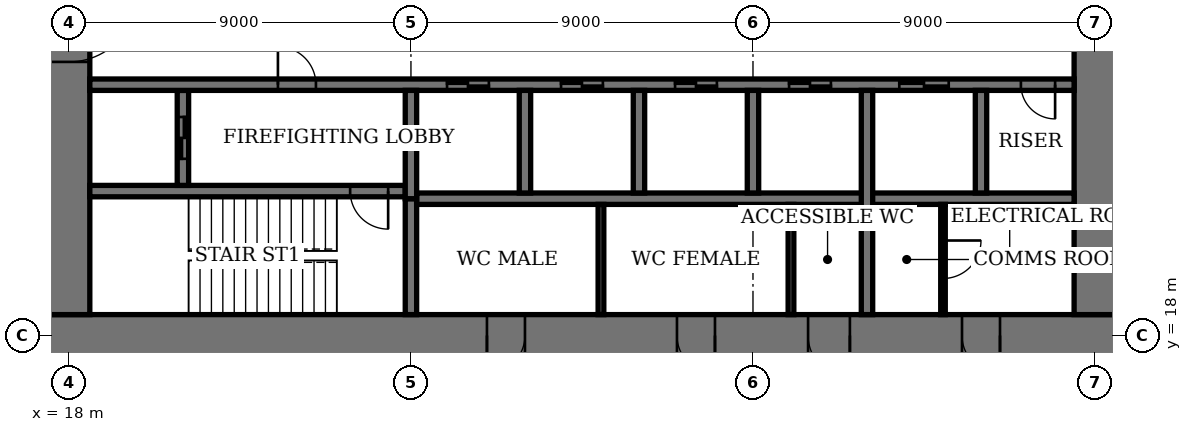
"""IFC4 building model, lengths in metres.
Left out: names, types, materials, properties, quantities, classifications, styles, units other than length and angle.
Written with IfcOpenShell. Run it as: python <this file> out.ifc"""

import sys

from ifc_helpers import new_model, si_unit, direction, frame, frame_2d, origin, place, context, subcontext, project, spatial, rectangle, extrude, element, fill, save


model = new_model("IFC4")
c1 = context("Model", 3, precision=1e-05, world=origin(), true_north=direction((0.0, 1.0)))
c2 = subcontext(c1, "Body", "Model", "MODEL_VIEW")
j1 = project(units=[si_unit("LENGTHUNIT", "METRE"), si_unit("PLANEANGLEUNIT", "RADIAN")], contexts=[c1])
p1 = place(None, origin())
s1 = spatial("IfcSite", under=j1, at=p1, CompositionType="ELEMENT")
p2 = place(p1, origin())
s2 = spatial("IfcBuilding", under=s1, at=p2, CompositionType="ELEMENT")
p3 = place(p2, frame((0.0, 0.0, 251.4)))
s3 = spatial("IfcBuildingStorey", under=s2, at=p3, CompositionType="ELEMENT", Elevation=251.4)
p4 = place(p3, frame((17.45, 18.0, 0.0), z_axis=(0.0, 0.0, 1.0), x_axis=(1.0, 0.0, 0.0)))
e1 = element("IfcWall", 1, at=p4, inside=s3, PredefinedType="SHEAR", context=c2, shape_type="SweptSolid", body=[
    extrude(rectangle(XDim=28.1, YDim=1.1, at=frame_2d((14.05, 0.0))), origin(), (0.0, 0.0, 1.0), 4.0),
])
p5 = place(p4, frame((11.55, 0.0, 0.0)))
e2 = element("IfcOpeningElement", 2, at=p5, cuts=e1, PredefinedType="OPENING", context=c2, shape_type="SweptSolid", body=[
    extrude(rectangle(XDim=1.0, YDim=2.4, at=frame_2d((0.5, 1.2))), frame((0.0, 0.56, 0.0), z_axis=(0.0, -1.0, 0.0), x_axis=(1.0, 0.0, 0.0)), (0.0, 0.0, 1.0), 1.12),
])
p6 = place(p4, frame((16.55, 0.0, 0.0)))
e3 = element("IfcOpeningElement", 3, at=p6, cuts=e1, PredefinedType="OPENING", context=c2, shape_type="SweptSolid", body=[
    extrude(rectangle(XDim=1.0, YDim=2.4, at=frame_2d((0.5, 1.2))), frame((0.0, 0.56, 0.0), z_axis=(0.0, -1.0, 0.0), x_axis=(1.0, 0.0, 0.0)), (0.0, 0.0, 1.0), 1.12),
])
p7 = place(p4, frame((20.0, 0.0, 0.0)))
e4 = element("IfcOpeningElement", 4, at=p7, cuts=e1, PredefinedType="OPENING", context=c2, shape_type="SweptSolid", body=[
    extrude(rectangle(XDim=1.1, YDim=2.4, at=frame_2d((0.55, 1.2))), frame((0.0, 0.56, 0.0), z_axis=(0.0, -1.0, 0.0), x_axis=(1.0, 0.0, 0.0)), (0.0, 0.0, 1.0), 1.12),
])
p8 = place(p4, frame((24.05, 0.0, 0.0)))
e5 = element("IfcOpeningElement", 5, at=p8, cuts=e1, PredefinedType="OPENING", context=c2, shape_type="SweptSolid", body=[
    extrude(rectangle(XDim=1.0, YDim=2.4, at=frame_2d((0.5, 1.2))), frame((0.0, 0.56, 0.0), z_axis=(0.0, -1.0, 0.0), x_axis=(1.0, 0.0, 0.0)), (0.0, 0.0, 1.0), 1.12),
])
p9 = place(p3, frame((18.0, 35.45, 0.0), z_axis=(0.0, 0.0, 1.0), x_axis=(0.0, -1.0, 0.0)))
e6 = element("IfcWall", 6, at=p9, inside=s3, PredefinedType="SHEAR", context=c2, shape_type="SweptSolid", body=[
    extrude(rectangle(XDim=16.9, YDim=1.1, at=frame_2d((8.45, 0.0))), origin(), (0.0, 0.0, 1.0), 4.0),
])
p10 = place(p9, frame((8.45, 0.0, 0.0)))
e7 = element("IfcOpeningElement", 7, at=p10, cuts=e6, PredefinedType="OPENING", context=c2, shape_type="SweptSolid", body=[
    extrude(rectangle(XDim=1.8, YDim=2.4, at=frame_2d((0.9, 1.2))), frame((0.0, 0.56, 0.0), z_axis=(0.0, -1.0, 0.0), x_axis=(1.0, 0.0, 0.0)), (0.0, 0.0, 1.0), 1.12),
])
p11 = place(p3, frame((45.0, 18.55, 0.0), z_axis=(0.0, 0.0, 1.0), x_axis=(0.0, 1.0, 0.0)))
e8 = element("IfcWall", 8, at=p11, inside=s3, PredefinedType="SHEAR", context=c2, shape_type="SweptSolid", body=[
    extrude(rectangle(XDim=16.9, YDim=1.1, at=frame_2d((8.45, 0.0))), origin(), (0.0, 0.0, 1.0), 4.0),
])
p12 = place(p11, frame((8.45, 0.0, 0.0)))
e9 = element("IfcOpeningElement", 9, at=p12, cuts=e8, PredefinedType="OPENING", context=c2, shape_type="SweptSolid", body=[
    extrude(rectangle(XDim=1.8, YDim=2.4, at=frame_2d((0.9, 1.2))), frame((0.0, 0.56, 0.0), z_axis=(0.0, -1.0, 0.0), x_axis=(1.0, 0.0, 0.0)), (0.0, 0.0, 1.0), 1.12),
])
p13 = place(p3, frame((18.55, 21.8, 0.0), z_axis=(0.0, 0.0, 1.0), x_axis=(1.0, 0.0, 0.0)))
e10 = element("IfcWall", 10, at=p13, inside=s3, PredefinedType="SHEAR", context=c2, shape_type="SweptSolid", body=[
    extrude(rectangle(XDim=8.3, YDim=0.3, at=frame_2d((4.15, 0.0))), origin(), (0.0, 0.0, 1.0), 4.0),
])
p14 = place(p13, frame((6.85, 0.0, 0.0)))
e11 = element("IfcOpeningElement", 11, at=p14, cuts=e10, PredefinedType="OPENING", context=c2, shape_type="SweptSolid", body=[
    extrude(rectangle(XDim=1.0, YDim=2.4, at=frame_2d((0.5, 1.2))), frame((0.0, 0.16, 0.0), z_axis=(0.0, -1.0, 0.0), x_axis=(1.0, 0.0, 0.0)), (0.0, 0.0, 1.0), 0.32),
])
p15 = place(p3, frame((27.0, 18.55, 0.0), z_axis=(0.0, 0.0, 1.0), x_axis=(0.0, 1.0, 0.0)))
e12 = element("IfcWall", 12, at=p15, inside=s3, PredefinedType="SHEAR", context=c2, shape_type="SweptSolid", body=[
    extrude(rectangle(XDim=3.05, YDim=0.3, at=frame_2d((1.525, 0.0))), origin(), (0.0, 0.0, 1.0), 4.0),
])
p16 = place(p3, frame((21.0, 21.95, 0.0), z_axis=(0.0, 0.0, 1.0), x_axis=(0.0, 1.0, 0.0)))
e13 = element("IfcWall", 13, at=p16, inside=s3, PredefinedType="SHEAR", context=c2, shape_type="SweptSolid", body=[
    extrude(rectangle(XDim=2.5, YDim=0.3, at=frame_2d((1.25, 0.0))), origin(), (0.0, 0.0, 1.0), 4.0),
])
p17 = place(p16, frame((0.7, 0.0, 0.0)))
e14 = element("IfcOpeningElement", 14, at=p17, cuts=e13, PredefinedType="OPENING", context=c2, shape_type="SweptSolid", body=[
    extrude(rectangle(XDim=1.1, YDim=2.4, at=frame_2d((0.55, 1.2))), frame((0.0, 0.16, 0.0), z_axis=(0.0, -1.0, 0.0), x_axis=(1.0, 0.0, 0.0)), (0.0, 0.0, 1.0), 0.32),
])
p18 = place(p3, frame((18.55, 24.6, 0.0), z_axis=(0.0, 0.0, 1.0), x_axis=(1.0, 0.0, 0.0)))
e15 = element("IfcWall", 15, at=p18, inside=s3, PredefinedType="SHEAR", context=c2, shape_type="SweptSolid", body=[
    extrude(rectangle(XDim=25.9, YDim=0.3, at=frame_2d((12.95, 0.0))), origin(), (0.0, 0.0, 1.0), 4.0),
])
p19 = place(p18, frame((4.95, 0.0, 0.0)))
e16 = element("IfcOpeningElement", 16, at=p19, cuts=e15, PredefinedType="OPENING", context=c2, shape_type="SweptSolid", body=[
    extrude(rectangle(XDim=1.0, YDim=2.4, at=frame_2d((0.5, 1.2))), frame((0.0, 0.16, 0.0), z_axis=(0.0, -1.0, 0.0), x_axis=(1.0, 0.0, 0.0)), (0.0, 0.0, 1.0), 0.32),
])
p20 = place(p18, frame((24.5, 0.0, 0.0)))
e17 = element("IfcOpeningElement", 17, at=p20, cuts=e15, PredefinedType="OPENING", context=c2, shape_type="SweptSolid", body=[
    extrude(rectangle(XDim=0.9, YDim=2.1, at=frame_2d((0.45, 1.05))), frame((0.0, 0.16, 0.0), z_axis=(0.0, -1.0, 0.0), x_axis=(1.0, 0.0, 0.0)), (0.0, 0.0, 1.0), 0.32),
])
p21 = place(p18, frame((9.4, 0.0, 0.0)))
e18 = element("IfcOpeningElement", 18, at=p21, cuts=e15, PredefinedType="OPENING", context=c2, shape_type="SweptSolid", body=[
    extrude(rectangle(XDim=1.1, YDim=2.4, at=frame_2d((0.55, 1.2))), frame((0.0, 0.16, 0.0), z_axis=(0.0, -1.0, 0.0), x_axis=(1.0, 0.0, 0.0)), (0.0, 0.0, 1.0), 0.32),
])
p22 = place(p18, frame((12.4, 0.0, 0.0)))
e19 = element("IfcOpeningElement", 19, at=p22, cuts=e15, PredefinedType="OPENING", context=c2, shape_type="SweptSolid", body=[
    extrude(rectangle(XDim=1.1, YDim=2.4, at=frame_2d((0.55, 1.2))), frame((0.0, 0.16, 0.0), z_axis=(0.0, -1.0, 0.0), x_axis=(1.0, 0.0, 0.0)), (0.0, 0.0, 1.0), 0.32),
])
p23 = place(p18, frame((15.4, 0.0, 0.0)))
e20 = element("IfcOpeningElement", 20, at=p23, cuts=e15, PredefinedType="OPENING", context=c2, shape_type="SweptSolid", body=[
    extrude(rectangle(XDim=1.1, YDim=2.4, at=frame_2d((0.55, 1.2))), frame((0.0, 0.16, 0.0), z_axis=(0.0, -1.0, 0.0), x_axis=(1.0, 0.0, 0.0)), (0.0, 0.0, 1.0), 0.32),
])
p24 = place(p18, frame((18.4, 0.0, 0.0)))
e21 = element("IfcOpeningElement", 21, at=p24, cuts=e15, PredefinedType="OPENING", context=c2, shape_type="SweptSolid", body=[
    extrude(rectangle(XDim=1.1, YDim=2.4, at=frame_2d((0.55, 1.2))), frame((0.0, 0.16, 0.0), z_axis=(0.0, -1.0, 0.0), x_axis=(1.0, 0.0, 0.0)), (0.0, 0.0, 1.0), 0.32),
])
p25 = place(p18, frame((21.3, 0.0, 0.0)))
e22 = element("IfcOpeningElement", 22, at=p25, cuts=e15, PredefinedType="OPENING", context=c2, shape_type="SweptSolid", body=[
    extrude(rectangle(XDim=1.3, YDim=2.4, at=frame_2d((0.65, 1.2))), frame((0.0, 0.16, 0.0), z_axis=(0.0, -1.0, 0.0), x_axis=(1.0, 0.0, 0.0)), (0.0, 0.0, 1.0), 0.32),
])
p26 = place(p3, frame((27.15, 21.6, 0.0), z_axis=(0.0, 0.0, 1.0), x_axis=(1.0, 0.0, 0.0)))
e23 = element("IfcWall", 23, at=p26, inside=s3, PredefinedType="SHEAR", context=c2, shape_type="SweptSolid", body=[
    extrude(rectangle(XDim=17.3, YDim=0.3, at=frame_2d((8.65, 0.0))), origin(), (0.0, 0.0, 1.0), 4.0),
])
for number, where, z_axis, x_axis in (
    (24, (30.0, 21.75, 0.0), (0.0, 0.0, 1.0), (0.0, 1.0, 0.0)),
    (25, (33.0, 21.75, 0.0), (0.0, 0.0, 1.0), (0.0, 1.0, 0.0)),
    (26, (36.0, 21.75, 0.0), (0.0, 0.0, 1.0), (0.0, 1.0, 0.0)),
):
    element("IfcWall", number, at=place(p3, frame(where, z_axis=z_axis, x_axis=x_axis)), inside=s3, PredefinedType="SHEAR", context=c2, shape_type="SweptSolid", body=[
        extrude(rectangle(XDim=2.7, YDim=0.3, at=frame_2d((1.35, 0.0))), origin(), (0.0, 0.0, 1.0), 4.0),
    ])
p27 = place(p3, frame((39.0, 18.55, 0.0), z_axis=(0.0, 0.0, 1.0), x_axis=(0.0, 1.0, 0.0)))
e27 = element("IfcWall", 27, at=p27, inside=s3, PredefinedType="SHEAR", context=c2, shape_type="SweptSolid", body=[
    extrude(rectangle(XDim=5.9, YDim=0.3, at=frame_2d((2.95, 0.0))), origin(), (0.0, 0.0, 1.0), 4.0),
])
p28 = place(p3, frame((42.0, 21.75, 0.0), z_axis=(0.0, 0.0, 1.0), x_axis=(0.0, 1.0, 0.0)))
e28 = element("IfcWall", 28, at=p28, inside=s3, PredefinedType="SHEAR", context=c2, shape_type="SweptSolid", body=[
    extrude(rectangle(XDim=2.7, YDim=0.3, at=frame_2d((1.35, 0.0))), origin(), (0.0, 0.0, 1.0), 4.0),
])
p29 = place(p3, frame((27.0, 21.6, 0.0), z_axis=(0.0, 0.0, 1.0), x_axis=(0.0, 1.0, 0.0)))
e29 = element("IfcWall", 29, at=p29, inside=s3, PredefinedType="SHEAR", context=c2, shape_type="SweptSolid", body=[
    extrude(rectangle(XDim=2.85, YDim=0.3, at=frame_2d((1.425, 0.0))), origin(), (0.0, 0.0, 1.0), 4.0),
])
for number, where, z_axis, x_axis in (
    (30, (32.0, 18.55, 0.0), (0.0, 0.0, 1.0), (0.0, 1.0, 0.0)),
    (31, (37.0, 18.55, 0.0), (0.0, 0.0, 1.0), (0.0, 1.0, 0.0)),
):
    element("IfcWall", number, at=place(p3, frame(where, z_axis=z_axis, x_axis=x_axis)), inside=s3, PredefinedType="PARTITIONING", context=c2, shape_type="SweptSolid", body=[
        extrude(rectangle(XDim=2.9, YDim=0.15, at=frame_2d((1.45, 0.0))), origin(), (0.0, 0.0, 1.0), 3.75),
    ])
p30 = place(p3, frame((41.0, 18.55, 0.0), z_axis=(0.0, 0.0, 1.0), x_axis=(0.0, 1.0, 0.0)))
e32 = element("IfcWall", 32, at=p30, inside=s3, PredefinedType="PARTITIONING", context=c2, shape_type="SweptSolid", body=[
    extrude(rectangle(XDim=2.9, YDim=0.12, at=frame_2d((1.45, 0.0))), origin(), (0.0, 0.0, 1.0), 3.75),
])
p31 = place(p30, frame((0.95, 0.0, 0.0)))
e33 = element("IfcOpeningElement", 33, at=p31, cuts=e32, PredefinedType="OPENING", context=c2, shape_type="SweptSolid", body=[
    extrude(rectangle(XDim=1.0, YDim=2.4, at=frame_2d((0.5, 1.2))), frame((0.0, 0.07, 0.0), z_axis=(0.0, -1.0, 0.0), x_axis=(1.0, 0.0, 0.0)), (0.0, 0.0, 1.0), 0.14),
])
p32 = place(p10, origin())
e34 = element("IfcDoor", 34, at=p32, inside=s3, OperationType="DOUBLE_DOOR_DOUBLE_SWING", PredefinedType="DOOR", context=c2, shape_type="SweptSolid", body=[
    extrude(rectangle(XDim=1.8, YDim=2.4, at=frame_2d((0.9, 1.2))), frame((0.0, 0.03, 0.0), z_axis=(0.0, -1.0, 0.0), x_axis=(1.0, 0.0, 0.0)), (0.0, 0.0, 1.0), 0.06),
    extrude(rectangle(XDim=0.04, YDim=2.4, at=frame_2d((0.02, 1.2))), frame((0.0, 0.55, 0.0), z_axis=(0.0, -1.0, 0.0), x_axis=(1.0, 0.0, 0.0)), (0.0, 0.0, 1.0), 1.1),
    extrude(rectangle(XDim=0.04, YDim=2.4, at=frame_2d((1.78, 1.2))), frame((0.0, 0.55, 0.0), z_axis=(0.0, -1.0, 0.0), x_axis=(1.0, 0.0, 0.0)), (0.0, 0.0, 1.0), 1.1),
    extrude(rectangle(XDim=1.8, YDim=0.04, at=frame_2d((0.9, 2.38))), frame((0.0, 0.55, 0.0), z_axis=(0.0, -1.0, 0.0), x_axis=(1.0, 0.0, 0.0)), (0.0, 0.0, 1.0), 1.1),
])
fill(e7, e34)
p33 = place(p5, origin())
e35 = element("IfcDoor", 35, at=p33, inside=s3, OperationType="SINGLE_SWING_LEFT", PredefinedType="DOOR", context=c2, shape_type="SweptSolid", body=[
    extrude(rectangle(XDim=1.0, YDim=2.4, at=frame_2d((0.5, 1.2))), frame((0.0, 0.025, 0.0), z_axis=(0.0, -1.0, 0.0), x_axis=(1.0, 0.0, 0.0)), (0.0, 0.0, 1.0), 0.05),
    extrude(rectangle(XDim=0.04, YDim=2.4, at=frame_2d((0.02, 1.2))), frame((0.0, 0.4, 0.0), z_axis=(0.0, -1.0, 0.0), x_axis=(1.0, 0.0, 0.0)), (0.0, 0.0, 1.0), 0.8),
    extrude(rectangle(XDim=0.04, YDim=2.4, at=frame_2d((0.98, 1.2))), frame((0.0, 0.4, 0.0), z_axis=(0.0, -1.0, 0.0), x_axis=(1.0, 0.0, 0.0)), (0.0, 0.0, 1.0), 0.8),
    extrude(rectangle(XDim=1.0, YDim=0.04, at=frame_2d((0.5, 2.38))), frame((0.0, 0.4, 0.0), z_axis=(0.0, -1.0, 0.0), x_axis=(1.0, 0.0, 0.0)), (0.0, 0.0, 1.0), 0.8),
])
fill(e2, e35)
p34 = place(p6, origin())
e36 = element("IfcDoor", 36, at=p34, inside=s3, OperationType="SINGLE_SWING_RIGHT", PredefinedType="DOOR", context=c2, shape_type="SweptSolid", body=[
    extrude(rectangle(XDim=1.0, YDim=2.4, at=frame_2d((0.5, 1.2))), frame((0.0, 0.025, 0.0), z_axis=(0.0, -1.0, 0.0), x_axis=(1.0, 0.0, 0.0)), (0.0, 0.0, 1.0), 0.05),
    extrude(rectangle(XDim=0.04, YDim=2.4, at=frame_2d((0.02, 1.2))), frame((0.0, 0.4, 0.0), z_axis=(0.0, -1.0, 0.0), x_axis=(1.0, 0.0, 0.0)), (0.0, 0.0, 1.0), 0.8),
    extrude(rectangle(XDim=0.04, YDim=2.4, at=frame_2d((0.98, 1.2))), frame((0.0, 0.4, 0.0), z_axis=(0.0, -1.0, 0.0), x_axis=(1.0, 0.0, 0.0)), (0.0, 0.0, 1.0), 0.8),
    extrude(rectangle(XDim=1.0, YDim=0.04, at=frame_2d((0.5, 2.38))), frame((0.0, 0.4, 0.0), z_axis=(0.0, -1.0, 0.0), x_axis=(1.0, 0.0, 0.0)), (0.0, 0.0, 1.0), 0.8),
])
fill(e3, e36)
p35 = place(p7, origin())
e37 = element("IfcDoor", 37, at=p35, inside=s3, OperationType="SINGLE_SWING_RIGHT", PredefinedType="DOOR", context=c2, shape_type="SweptSolid", body=[
    extrude(rectangle(XDim=1.1, YDim=2.4, at=frame_2d((0.55, 1.2))), frame((0.0, 0.025, 0.0), z_axis=(0.0, -1.0, 0.0), x_axis=(1.0, 0.0, 0.0)), (0.0, 0.0, 1.0), 0.05),
    extrude(rectangle(XDim=0.04, YDim=2.4, at=frame_2d((0.02, 1.2))), frame((0.0, 0.44, 0.0), z_axis=(0.0, -1.0, 0.0), x_axis=(1.0, 0.0, 0.0)), (0.0, 0.0, 1.0), 0.88),
    extrude(rectangle(XDim=0.04, YDim=2.4, at=frame_2d((1.08, 1.2))), frame((0.0, 0.44, 0.0), z_axis=(0.0, -1.0, 0.0), x_axis=(1.0, 0.0, 0.0)), (0.0, 0.0, 1.0), 0.88),
    extrude(rectangle(XDim=1.1, YDim=0.04, at=frame_2d((0.55, 2.38))), frame((0.0, 0.44, 0.0), z_axis=(0.0, -1.0, 0.0), x_axis=(1.0, 0.0, 0.0)), (0.0, 0.0, 1.0), 0.88),
])
fill(e4, e37)
p36 = place(p8, origin())
e38 = element("IfcDoor", 38, at=p36, inside=s3, OperationType="SINGLE_SWING_RIGHT", PredefinedType="DOOR", context=c2, shape_type="SweptSolid", body=[
    extrude(rectangle(XDim=1.0, YDim=2.4, at=frame_2d((0.5, 1.2))), frame((0.0, 0.025, 0.0), z_axis=(0.0, -1.0, 0.0), x_axis=(1.0, 0.0, 0.0)), (0.0, 0.0, 1.0), 0.05),
    extrude(rectangle(XDim=0.04, YDim=2.4, at=frame_2d((0.02, 1.2))), frame((0.0, 0.4, 0.0), z_axis=(0.0, -1.0, 0.0), x_axis=(1.0, 0.0, 0.0)), (0.0, 0.0, 1.0), 0.8),
    extrude(rectangle(XDim=0.04, YDim=2.4, at=frame_2d((0.98, 1.2))), frame((0.0, 0.4, 0.0), z_axis=(0.0, -1.0, 0.0), x_axis=(1.0, 0.0, 0.0)), (0.0, 0.0, 1.0), 0.8),
    extrude(rectangle(XDim=1.0, YDim=0.04, at=frame_2d((0.5, 2.38))), frame((0.0, 0.4, 0.0), z_axis=(0.0, -1.0, 0.0), x_axis=(1.0, 0.0, 0.0)), (0.0, 0.0, 1.0), 0.8),
])
fill(e5, e38)
p37 = place(p14, origin())
e39 = element("IfcDoor", 39, at=p37, inside=s3, OperationType="SINGLE_SWING_RIGHT", PredefinedType="DOOR", context=c2, shape_type="SweptSolid", body=[
    extrude(rectangle(XDim=1.0, YDim=2.4, at=frame_2d((0.5, 1.2))), frame((0.0, 0.03, 0.0), z_axis=(0.0, -1.0, 0.0), x_axis=(1.0, 0.0, 0.0)), (0.0, 0.0, 1.0), 0.06),
])
fill(e11, e39)
p38 = place(p19, origin())
e40 = element("IfcDoor", 40, at=p38, inside=s3, OperationType="SINGLE_SWING_RIGHT", PredefinedType="DOOR", context=c2, shape_type="SweptSolid", body=[
    extrude(rectangle(XDim=1.0, YDim=2.4, at=frame_2d((0.5, 1.2))), frame((0.0, 0.03, 0.0), z_axis=(0.0, -1.0, 0.0), x_axis=(1.0, 0.0, 0.0)), (0.0, 0.0, 1.0), 0.06),
])
fill(e16, e40)
p39 = place(p20, origin())
e41 = element("IfcDoor", 41, at=p39, inside=s3, OperationType="SINGLE_SWING_RIGHT", PredefinedType="DOOR", context=c2, shape_type="SweptSolid", body=[
    extrude(rectangle(XDim=0.9, YDim=2.1, at=frame_2d((0.45, 1.05))), frame((0.0, 0.03, 0.0), z_axis=(0.0, -1.0, 0.0), x_axis=(1.0, 0.0, 0.0)), (0.0, 0.0, 1.0), 0.06),
])
fill(e17, e41)
p40 = place(p31, origin())
e42 = element("IfcDoor", 42, at=p40, inside=s3, OperationType="SINGLE_SWING_RIGHT", PredefinedType="DOOR", context=c2, shape_type="SweptSolid", body=[
    extrude(rectangle(XDim=1.0, YDim=2.4, at=frame_2d((0.5, 1.2))), frame((0.0, 0.03, 0.0), z_axis=(0.0, -1.0, 0.0), x_axis=(1.0, 0.0, 0.0)), (0.0, 0.0, 1.0), 0.06),
])
fill(e33, e42)
p41 = place(p21, origin())
e43 = element("IfcDoor", 43, at=p41, inside=s3, OperationType="DOUBLE_DOOR_SLIDING", PredefinedType="DOOR", context=c2, shape_type="SweptSolid", body=[
    extrude(rectangle(XDim=1.1, YDim=2.4, at=frame_2d((0.55, 1.2))), frame((0.0, 0.02, 0.0), z_axis=(0.0, -1.0, 0.0), x_axis=(1.0, 0.0, 0.0)), (0.0, 0.0, 1.0), 0.04),
])
fill(e18, e43)
p42 = place(p22, origin())
e44 = element("IfcDoor", 44, at=p42, inside=s3, OperationType="DOUBLE_DOOR_SLIDING", PredefinedType="DOOR", context=c2, shape_type="SweptSolid", body=[
    extrude(rectangle(XDim=1.1, YDim=2.4, at=frame_2d((0.55, 1.2))), frame((0.0, 0.02, 0.0), z_axis=(0.0, -1.0, 0.0), x_axis=(1.0, 0.0, 0.0)), (0.0, 0.0, 1.0), 0.04),
])
fill(e19, e44)
p43 = place(p23, origin())
e45 = element("IfcDoor", 45, at=p43, inside=s3, OperationType="DOUBLE_DOOR_SLIDING", PredefinedType="DOOR", context=c2, shape_type="SweptSolid", body=[
    extrude(rectangle(XDim=1.1, YDim=2.4, at=frame_2d((0.55, 1.2))), frame((0.0, 0.02, 0.0), z_axis=(0.0, -1.0, 0.0), x_axis=(1.0, 0.0, 0.0)), (0.0, 0.0, 1.0), 0.04),
])
fill(e20, e45)
p44 = place(p24, origin())
e46 = element("IfcDoor", 46, at=p44, inside=s3, OperationType="DOUBLE_DOOR_SLIDING", PredefinedType="DOOR", context=c2, shape_type="SweptSolid", body=[
    extrude(rectangle(XDim=1.1, YDim=2.4, at=frame_2d((0.55, 1.2))), frame((0.0, 0.02, 0.0), z_axis=(0.0, -1.0, 0.0), x_axis=(1.0, 0.0, 0.0)), (0.0, 0.0, 1.0), 0.04),
])
fill(e21, e46)
p45 = place(p25, origin())
e47 = element("IfcDoor", 47, at=p45, inside=s3, OperationType="DOUBLE_DOOR_SLIDING", PredefinedType="DOOR", context=c2, shape_type="SweptSolid", body=[
    extrude(rectangle(XDim=1.3, YDim=2.4, at=frame_2d((0.65, 1.2))), frame((0.0, 0.02, 0.0), z_axis=(0.0, -1.0, 0.0), x_axis=(1.0, 0.0, 0.0)), (0.0, 0.0, 1.0), 0.04),
])
fill(e22, e47)
p46 = place(p17, origin())
e48 = element("IfcDoor", 48, at=p46, inside=s3, OperationType="DOUBLE_DOOR_SLIDING", PredefinedType="DOOR", context=c2, shape_type="SweptSolid", body=[
    extrude(rectangle(XDim=1.1, YDim=2.4, at=frame_2d((0.55, 1.2))), frame((0.0, 0.03, 0.0), z_axis=(0.0, -1.0, 0.0), x_axis=(1.0, 0.0, 0.0)), (0.0, 0.0, 1.0), 0.06),
])
fill(e14, e48)
save(model, sys.argv[1])
